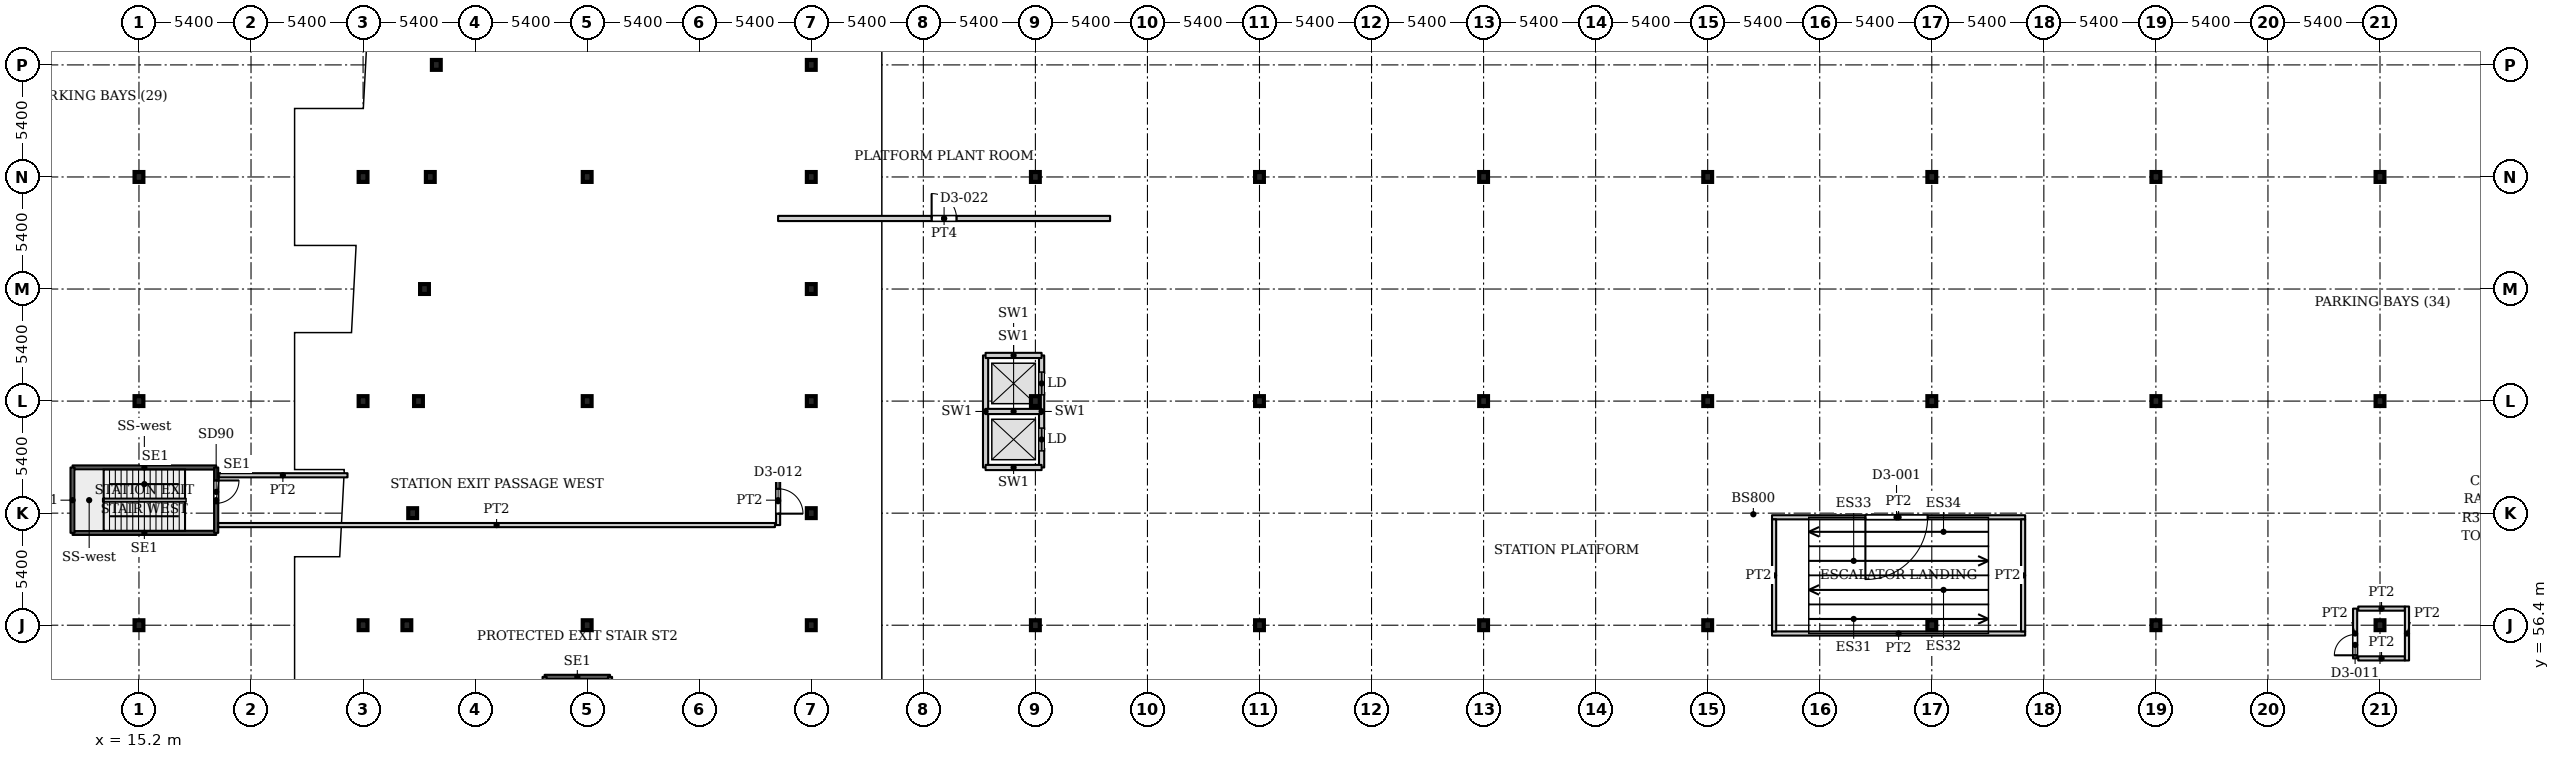
"""IFC4 building model, lengths in metres.
Left out: names, types, materials, properties, quantities, classifications, styles, units other than length and angle.
Written with IfcOpenShell. Run it as: python <this file> out.ifc"""

import sys

from ifc_helpers import new_model, si_unit, direction, frame, frame_2d, origin, origin_2d, place, context, subcontext, project, spatial, rectangle, i_section, extrude, source, transform, mapped, element, fill, save


model = new_model("IFC4")
c1 = context("Model", 3, precision=1e-05, world=origin(), true_north=direction((0.0, 1.0)))
c2 = subcontext(c1, "Body", "Model", "MODEL_VIEW")
j1 = project(units=[si_unit("LENGTHUNIT", "METRE"), si_unit("PLANEANGLEUNIT", "RADIAN")], contexts=[c1])
p1 = place(None, origin())
s1 = spatial("IfcSite", under=j1, at=p1, CompositionType="ELEMENT")
p2 = place(p1, origin())
s2 = spatial("IfcBuilding", under=s1, at=p2, CompositionType="ELEMENT")
p3 = place(p2, frame((0.0, 0.0, -15.0)))
s3 = spatial("IfcBuildingStorey", under=s2, at=p3, CompositionType="ELEMENT", Elevation=-15.0)
for number, where, z_axis, x_axis in (
    (1, (15.2, 56.4, 0.0), (0.0, 0.0, 1.0), (1.0, 0.0, 0.0)),
    (2, (26.0, 56.4, 0.0), (0.0, 0.0, 1.0), (1.0, 0.0, 0.0)),
    (3, (36.8, 56.4, 0.0), (0.0, 0.0, 1.0), (1.0, 0.0, 0.0)),
    (4, (47.6, 56.4, 0.0), (0.0, 0.0, 1.0), (1.0, 0.0, 0.0)),
    (5, (58.4, 56.4, 0.0), (0.0, 0.0, 1.0), (1.0, 0.0, 0.0)),
    (6, (69.2, 56.4, 0.0), (0.0, 0.0, 1.0), (1.0, 0.0, 0.0)),
    (7, (80.0, 56.4, 0.0), (0.0, 0.0, 1.0), (1.0, 0.0, 0.0)),
    (8, (90.8, 56.4, 0.0), (0.0, 0.0, 1.0), (1.0, 0.0, 0.0)),
    (9, (101.6, 56.4, 0.0), (0.0, 0.0, 1.0), (1.0, 0.0, 0.0)),
    (10, (112.4, 56.4, 0.0), (0.0, 0.0, 1.0), (1.0, 0.0, 0.0)),
    (11, (123.2, 56.4, 0.0), (0.0, 0.0, 1.0), (1.0, 0.0, 0.0)),
    (12, (15.2, 67.2, 0.0), (0.0, 0.0, 1.0), (1.0, 0.0, 0.0)),
    (13, (26.0, 67.2, 0.0), (0.0, 0.0, 1.0), (1.0, 0.0, 0.0)),
    (14, (36.8, 67.2, 0.0), (0.0, 0.0, 1.0), (1.0, 0.0, 0.0)),
    (15, (47.6, 67.2, 0.0), (0.0, 0.0, 1.0), (1.0, 0.0, 0.0)),
    (16, (58.4, 67.2, 0.0), (0.0, 0.0, 1.0), (1.0, 0.0, 0.0)),
    (17, (69.2, 67.2, 0.0), (0.0, 0.0, 1.0), (1.0, 0.0, 0.0)),
    (18, (80.0, 67.2, 0.0), (0.0, 0.0, 1.0), (1.0, 0.0, 0.0)),
    (19, (90.8, 67.2, 0.0), (0.0, 0.0, 1.0), (1.0, 0.0, 0.0)),
    (20, (101.6, 67.2, 0.0), (0.0, 0.0, 1.0), (1.0, 0.0, 0.0)),
    (21, (112.4, 67.2, 0.0), (0.0, 0.0, 1.0), (1.0, 0.0, 0.0)),
    (22, (123.2, 67.2, 0.0), (0.0, 0.0, 1.0), (1.0, 0.0, 0.0)),
    (23, (15.2, 78.0, 0.0), (0.0, 0.0, 1.0), (1.0, 0.0, 0.0)),
    (24, (26.0, 78.0, 0.0), (0.0, 0.0, 1.0), (1.0, 0.0, 0.0)),
    (25, (36.8, 78.0, 0.0), (0.0, 0.0, 1.0), (1.0, 0.0, 0.0)),
    (26, (47.6, 78.0, 0.0), (0.0, 0.0, 1.0), (1.0, 0.0, 0.0)),
    (27, (58.4, 78.0, 0.0), (0.0, 0.0, 1.0), (1.0, 0.0, 0.0)),
    (28, (69.2, 78.0, 0.0), (0.0, 0.0, 1.0), (1.0, 0.0, 0.0)),
    (29, (80.0, 78.0, 0.0), (0.0, 0.0, 1.0), (1.0, 0.0, 0.0)),
    (30, (90.8, 78.0, 0.0), (0.0, 0.0, 1.0), (1.0, 0.0, 0.0)),
    (31, (101.6, 78.0, 0.0), (0.0, 0.0, 1.0), (1.0, 0.0, 0.0)),
    (32, (112.4, 78.0, 0.0), (0.0, 0.0, 1.0), (1.0, 0.0, 0.0)),
    (33, (123.2, 78.0, 0.0), (0.0, 0.0, 1.0), (1.0, 0.0, 0.0)),
    (34, (28.11, 56.4, 0.0), (0.0, 0.0, 1.0), (1.0, 0.0, 0.0)),
    (35, (28.39, 61.8, 0.0), (0.0, 0.0, 1.0), (1.0, 0.0, 0.0)),
    (36, (47.6, 61.8, 0.0), (0.0, 0.0, 1.0), (1.0, 0.0, 0.0)),
    (37, (28.67, 67.2, 0.0), (0.0, 0.0, 1.0), (1.0, 0.0, 0.0)),
    (38, (28.96, 72.6, 0.0), (0.0, 0.0, 1.0), (1.0, 0.0, 0.0)),
    (39, (47.6, 72.6, 0.0), (0.0, 0.0, 1.0), (1.0, 0.0, 0.0)),
    (40, (29.24, 78.0, 0.0), (0.0, 0.0, 1.0), (1.0, 0.0, 0.0)),
    (41, (29.53, 83.4, 0.0), (0.0, 0.0, 1.0), (1.0, 0.0, 0.0)),
    (42, (47.6, 83.4, 0.0), (0.0, 0.0, 1.0), (1.0, 0.0, 0.0)),
):
    element("IfcColumn", number, at=place(p3, frame(where, z_axis=z_axis, x_axis=x_axis)), inside=s3, PredefinedType="COLUMN", context=c2, shape_type="SweptSolid", body=[
        extrude(i_section(OverallWidth=0.424, OverallDepth=0.474, WebThickness=0.048, FlangeThickness=0.077, FilletRadius=0.014, at=origin_2d()), origin(), (0.0, 0.0, 1.0), 5.0),
    ])
p4 = place(p3, frame((34.75, 53.91, 0.0), z_axis=(0.0, 0.0, 1.0), x_axis=(1.0, 0.0, 0.0)))
e43 = element("IfcWall", 43, at=p4, inside=s3, PredefinedType="SHEAR", context=c2, shape_type="SweptSolid", body=[
    extrude(rectangle(XDim=3.15, YDim=0.2, at=frame_2d((1.575, 0.0))), origin(), (0.0, 0.0, 1.0), 5.0),
])
p5 = place(p3, frame((34.75, 47.5, 0.0), z_axis=(0.0, 0.0, 1.0), x_axis=(0.0, 1.0, 0.0)))
e44 = element("IfcWall", 44, at=p5, inside=s3, PredefinedType="SHEAR", context=c2, shape_type="SweptSolid", body=[
    extrude(rectangle(XDim=6.41, YDim=0.2, at=frame_2d((3.205, 0.0))), origin(), (0.0, 0.0, 1.0), 5.0),
])
p6 = place(p3, frame((37.9, 44.75, 0.0), z_axis=(0.0, 0.0, 1.0), x_axis=(0.0, 1.0, 0.0)))
e45 = element("IfcWall", 45, at=p6, inside=s3, PredefinedType="SHEAR", context=c2, shape_type="SweptSolid", body=[
    extrude(rectangle(XDim=9.16, YDim=0.2, at=frame_2d((4.58, 0.0))), origin(), (0.0, 0.0, 1.0), 5.0),
])
p7 = place(p3, frame((56.0, 64.0, 0.0), z_axis=(0.0, 0.0, 1.0), x_axis=(0.0, 1.0, 0.0)))
e46 = element("IfcWall", 46, at=p7, inside=s3, PredefinedType="PARTITIONING", context=c2, shape_type="SweptSolid", body=[
    extrude(rectangle(XDim=5.4, YDim=0.25, at=frame_2d((2.7, 0.0))), origin(), (0.0, 0.0, 1.0), 5.0),
])
p8 = place(p3, frame((58.7, 64.0, 0.0), z_axis=(0.0, 0.0, 1.0), x_axis=(0.0, 1.0, 0.0)))
e47 = element("IfcWall", 47, at=p8, inside=s3, PredefinedType="PARTITIONING", context=c2, shape_type="SweptSolid", body=[
    extrude(rectangle(XDim=5.4, YDim=0.25, at=frame_2d((2.7, 0.0))), origin(), (0.0, 0.0, 1.0), 5.0),
])
p9 = place(p8, frame((0.8, 0.0, 0.0)))
e48 = element("IfcOpeningElement", 48, at=p9, cuts=e47, PredefinedType="OPENING", context=c2, shape_type="SweptSolid", body=[
    extrude(rectangle(XDim=1.1, YDim=2.2, at=frame_2d((0.55, 1.1))), frame((0.0, 0.135, 0.0), z_axis=(0.0, -1.0, 0.0), x_axis=(1.0, 0.0, 0.0)), (0.0, 0.0, 1.0), 0.27),
])
p10 = place(p8, frame((3.5, 0.0, 0.0)))
e49 = element("IfcOpeningElement", 49, at=p10, cuts=e47, PredefinedType="OPENING", context=c2, shape_type="SweptSolid", body=[
    extrude(rectangle(XDim=1.1, YDim=2.2, at=frame_2d((0.55, 1.1))), frame((0.0, 0.135, 0.0), z_axis=(0.0, -1.0, 0.0), x_axis=(1.0, 0.0, 0.0)), (0.0, 0.0, 1.0), 0.27),
])
for number, where, z_axis, x_axis in (
    (50, (56.0, 64.0, 0.0), (0.0, 0.0, 1.0), (1.0, 0.0, 0.0)),
    (51, (56.0, 66.7, 0.0), (0.0, 0.0, 1.0), (1.0, 0.0, 0.0)),
    (52, (56.0, 69.4, 0.0), (0.0, 0.0, 1.0), (1.0, 0.0, 0.0)),
):
    element("IfcWall", number, at=place(p3, frame(where, z_axis=z_axis, x_axis=x_axis)), inside=s3, PredefinedType="PARTITIONING", context=c2, shape_type="SweptSolid", body=[
        extrude(rectangle(XDim=2.7, YDim=0.25, at=frame_2d((1.35, 0.0))), origin(), (0.0, 0.0, 1.0), 5.0),
    ])
for number, where, z_axis, x_axis in (
    (53, (12.0, 60.85, 0.0), (0.0, 0.0, 1.0), (1.0, 0.0, 0.0)),
    (54, (12.0, 64.0, 0.0), (0.0, 0.0, 1.0), (1.0, 0.0, 0.0)),
):
    element("IfcWall", number, at=place(p3, frame(where, z_axis=z_axis, x_axis=x_axis)), inside=s3, PredefinedType="SHEAR", context=c2, shape_type="SweptSolid", body=[
        extrude(rectangle(XDim=6.92, YDim=0.2, at=frame_2d((3.46, 0.0))), origin(), (0.0, 0.0, 1.0), 5.0),
    ])
p11 = place(p3, frame((12.0, 60.85, 0.0), z_axis=(0.0, 0.0, 1.0), x_axis=(0.0, 1.0, 0.0)))
e55 = element("IfcWall", 55, at=p11, inside=s3, PredefinedType="SHEAR", context=c2, shape_type="SweptSolid", body=[
    extrude(rectangle(XDim=3.15, YDim=0.2, at=frame_2d((1.575, 0.0))), origin(), (0.0, 0.0, 1.0), 5.0),
])
p12 = place(p3, frame((18.92, 60.85, 0.0), z_axis=(0.0, 0.0, 1.0), x_axis=(0.0, 1.0, 0.0)))
e56 = element("IfcWall", 56, at=p12, inside=s3, PredefinedType="SHEAR", context=c2, shape_type="SweptSolid", body=[
    extrude(rectangle(XDim=3.15, YDim=0.2, at=frame_2d((1.575, 0.0))), origin(), (0.0, 0.0, 1.0), 5.0),
])
p13 = place(p12, frame((1.425, 0.0, 0.0)))
e57 = element("IfcOpeningElement", 57, at=p13, cuts=e56, PredefinedType="OPENING", context=c2, shape_type="SweptSolid", body=[
    extrude(rectangle(XDim=1.1, YDim=2.2, at=frame_2d((0.55, 1.1))), frame((0.0, 0.11, 0.0), z_axis=(0.0, -1.0, 0.0), x_axis=(1.0, 0.0, 0.0)), (0.0, 0.0, 1.0), 0.22),
])
p14 = place(p3, frame((19.02, 61.225, 0.0), z_axis=(0.0, 0.0, 1.0), x_axis=(1.0, 0.0, 0.0)))
e58 = element("IfcWall", 58, at=p14, inside=s3, PredefinedType="PARTITIONING", context=c2, shape_type="SweptSolid", body=[
    extrude(rectangle(XDim=26.83, YDim=0.2, at=frame_2d((13.415, 0.0))), origin(), (0.0, 0.0, 1.0), 4.68),
])
p15 = place(p3, frame((19.02, 63.625, 0.0), z_axis=(0.0, 0.0, 1.0), x_axis=(1.0, 0.0, 0.0)))
e59 = element("IfcWall", 59, at=p15, inside=s3, PredefinedType="PARTITIONING", context=c2, shape_type="SweptSolid", body=[
    extrude(rectangle(XDim=6.23, YDim=0.2, at=frame_2d((3.115, 0.0))), origin(), (0.0, 0.0, 1.0), 4.68),
])
p16 = place(p3, frame((46.0, 61.225, 0.0), z_axis=(0.0, 0.0, 1.0), x_axis=(0.0, 1.0, 0.0)))
e60 = element("IfcWall", 60, at=p16, inside=s3, PredefinedType="PARTITIONING", context=c2, shape_type="SweptSolid", body=[
    extrude(rectangle(XDim=2.4, YDim=0.2, at=frame_2d((1.2, 0.0))), origin(), (0.0, 0.0, 1.0), 4.68),
])
p17 = place(p16, frame((0.55, 0.0, 0.0)))
e61 = element("IfcOpeningElement", 61, at=p17, cuts=e60, PredefinedType="OPENING", context=c2, shape_type="SweptSolid", body=[
    extrude(rectangle(XDim=1.2, YDim=2.1, at=frame_2d((0.6, 1.05))), frame((0.0, 0.11, 0.0), z_axis=(0.0, -1.0, 0.0), x_axis=(1.0, 0.0, 0.0)), (0.0, 0.0, 1.0), 0.22),
])
p18 = place(p3, frame((46.0, 76.0, 0.0), z_axis=(0.0, 0.0, 1.0), x_axis=(1.0, 0.0, 0.0)))
e62 = element("IfcWall", 62, at=p18, inside=s3, PredefinedType="PARTITIONING", context=c2, shape_type="SweptSolid", body=[
    extrude(rectangle(XDim=16.0, YDim=0.25, at=frame_2d((8.0, 0.0))), origin(), (0.0, 0.0, 1.0), 4.68),
])
p19 = place(p18, frame((7.4, 0.0, 0.0)))
e63 = element("IfcOpeningElement", 63, at=p19, cuts=e62, PredefinedType="OPENING", context=c2, shape_type="SweptSolid", body=[
    extrude(rectangle(XDim=1.2, YDim=2.1, at=frame_2d((0.6, 1.05))), frame((0.0, 0.135, 0.0), z_axis=(0.0, -1.0, 0.0), x_axis=(1.0, 0.0, 0.0)), (0.0, 0.0, 1.0), 0.27),
])
p20 = place(p3, frame((93.9, 56.0, 0.0), z_axis=(0.0, 0.0, 1.0), x_axis=(1.0, 0.0, 0.0)))
e64 = element("IfcWall", 64, at=p20, inside=s3, PredefinedType="PARTITIONING", context=c2, shape_type="SweptSolid", body=[
    extrude(rectangle(XDim=12.2, YDim=0.2, at=frame_2d((6.1, 0.0))), origin(), (0.0, 0.0, 1.0), 4.68),
])
p21 = place(p3, frame((93.9, 61.6, 0.0), z_axis=(0.0, 0.0, 1.0), x_axis=(1.0, 0.0, 0.0)))
e65 = element("IfcWall", 65, at=p21, inside=s3, PredefinedType="PARTITIONING", context=c2, shape_type="SweptSolid", body=[
    extrude(rectangle(XDim=12.2, YDim=0.2, at=frame_2d((6.1, 0.0))), origin(), (0.0, 0.0, 1.0), 4.68),
])
p22 = place(p21, frame((4.5, 0.0, 0.0)))
e66 = element("IfcOpeningElement", 66, at=p22, cuts=e65, PredefinedType="OPENING", context=c2, shape_type="SweptSolid", body=[
    extrude(rectangle(XDim=3.0, YDim=2.1, at=frame_2d((1.5, 1.05))), frame((0.0, 0.11, 0.0), z_axis=(0.0, -1.0, 0.0), x_axis=(1.0, 0.0, 0.0)), (0.0, 0.0, 1.0), 0.22),
])
for number, where, z_axis, x_axis in (
    (67, (94.0, 56.1, 0.0), (0.0, 0.0, 1.0), (0.0, 1.0, 0.0)),
    (68, (106.0, 56.1, 0.0), (0.0, 0.0, 1.0), (0.0, 1.0, 0.0)),
):
    element("IfcWall", number, at=place(p3, frame(where, z_axis=z_axis, x_axis=x_axis)), inside=s3, PredefinedType="PARTITIONING", context=c2, shape_type="SweptSolid", body=[
        extrude(rectangle(XDim=5.4, YDim=0.2, at=frame_2d((2.7, 0.0))), origin(), (0.0, 0.0, 1.0), 4.68),
    ])
p23 = place(p3, frame((122.0, 54.8, 0.0), z_axis=(0.0, 0.0, 1.0), x_axis=(0.0, 1.0, 0.0)))
e69 = element("IfcWall", 69, at=p23, inside=s3, PredefinedType="PARTITIONING", context=c2, shape_type="SweptSolid", body=[
    extrude(rectangle(XDim=2.4, YDim=0.2, at=frame_2d((1.2, 0.0))), origin(), (0.0, 0.0, 1.0), 4.68),
])
p24 = place(p23, frame((0.15, 0.0, 0.0)))
e70 = element("IfcOpeningElement", 70, at=p24, cuts=e69, PredefinedType="OPENING", context=c2, shape_type="SweptSolid", body=[
    extrude(rectangle(XDim=1.0, YDim=2.1, at=frame_2d((0.5, 1.05))), frame((0.0, 0.11, 0.0), z_axis=(0.0, -1.0, 0.0), x_axis=(1.0, 0.0, 0.0)), (0.0, 0.0, 1.0), 0.22),
])
for number, where, z_axis, x_axis in (
    (71, (122.15, 54.8, 0.0), (0.0, 0.0, 1.0), (1.0, 0.0, 0.0)),
    (72, (122.15, 57.2, 0.0), (0.0, 0.0, 1.0), (1.0, 0.0, 0.0)),
):
    element("IfcWall", number, at=place(p3, frame(where, z_axis=z_axis, x_axis=x_axis)), inside=s3, PredefinedType="PARTITIONING", context=c2, shape_type="SweptSolid", body=[
        extrude(rectangle(XDim=2.25, YDim=0.2, at=frame_2d((1.125, 0.0))), origin(), (0.0, 0.0, 1.0), 4.68),
    ])
p25 = place(p3, frame((124.5, 54.7, 0.0), z_axis=(0.0, 0.0, 1.0), x_axis=(0.0, 1.0, 0.0)))
e73 = element("IfcWall", 73, at=p25, inside=s3, PredefinedType="PARTITIONING", context=c2, shape_type="SweptSolid", body=[
    extrude(rectangle(XDim=2.6, YDim=0.2, at=frame_2d((1.3, 0.0))), origin(), (0.0, 0.0, 1.0), 4.68),
])
m1 = source(origin(), c2, "Body", "SweptSolid", [
    extrude(rectangle(XDim=1.1, YDim=2.2, at=frame_2d((0.55, 1.1))), frame((0.0, 0.025, 0.0), z_axis=(0.0, -1.0, 0.0), x_axis=(1.0, 0.0, 0.0)), (0.0, 0.0, 1.0), 0.05),
])
p26 = place(p9, origin())
e74 = element("IfcDoor", 74, at=p26, inside=s3, OperationType="SLIDING_TO_LEFT", PredefinedType="DOOR", context=c2, shape_type="MappedRepresentation", body=[
    mapped(m1, transform((0.0, 0.0, 0.0), x_axis=(1.0, 0.0, 0.0), y_axis=(0.0, 1.0, 0.0), z_axis=(0.0, 0.0, 1.0), scale=1.0)),
])
fill(e48, e74)
p27 = place(p10, origin())
e75 = element("IfcDoor", 75, at=p27, inside=s3, OperationType="SLIDING_TO_LEFT", PredefinedType="DOOR", context=c2, shape_type="MappedRepresentation", body=[
    mapped(m1, transform((0.0, 0.0, 0.0), x_axis=(1.0, 0.0, 0.0), y_axis=(0.0, 1.0, 0.0), z_axis=(0.0, 0.0, 1.0), scale=1.0)),
])
fill(e49, e75)
m2 = source(origin(), c2, "Body", "SweptSolid", [
    extrude(rectangle(XDim=1.1, YDim=2.2, at=frame_2d((0.55, 1.1))), frame((0.0, 0.025, 0.0), z_axis=(0.0, -1.0, 0.0), x_axis=(1.0, 0.0, 0.0)), (0.0, 0.0, 1.0), 0.05),
])
p28 = place(p13, origin())
e76 = element("IfcDoor", 76, at=p28, inside=s3, OperationType="SINGLE_SWING_RIGHT", PredefinedType="DOOR", context=c2, shape_type="MappedRepresentation", body=[
    mapped(m2, transform((0.0, 0.0, 0.0), x_axis=(1.0, 0.0, 0.0), y_axis=(0.0, 1.0, 0.0), z_axis=(0.0, 0.0, 1.0), scale=1.0)),
])
fill(e57, e76)
m3 = source(origin(), c2, "Body", "SweptSolid", [
    extrude(rectangle(XDim=3.0, YDim=2.1, at=frame_2d((1.5, 1.05))), frame((0.0, 0.025, 0.0), z_axis=(0.0, -1.0, 0.0), x_axis=(1.0, 0.0, 0.0)), (0.0, 0.0, 1.0), 0.05),
])
p29 = place(p22, origin())
e77 = element("IfcDoor", 77, at=p29, inside=s3, OperationType="DOUBLE_DOOR_SINGLE_SWING", PredefinedType="DOOR", context=c2, shape_type="MappedRepresentation", body=[
    mapped(m3, transform((0.0, 0.0, 0.0), x_axis=(1.0, 0.0, 0.0), y_axis=(0.0, 1.0, 0.0), z_axis=(0.0, 0.0, 1.0), scale=1.0)),
])
fill(e66, e77)
m4 = source(origin(), c2, "Body", "SweptSolid", [
    extrude(rectangle(XDim=1.0, YDim=2.1, at=frame_2d((0.5, 1.05))), frame((0.0, 0.025, 0.0), z_axis=(0.0, -1.0, 0.0), x_axis=(1.0, 0.0, 0.0)), (0.0, 0.0, 1.0), 0.05),
])
p30 = place(p24, origin())
e78 = element("IfcDoor", 78, at=p30, inside=s3, OperationType="SINGLE_SWING_LEFT", PredefinedType="DOOR", context=c2, shape_type="MappedRepresentation", body=[
    mapped(m4, transform((0.0, 0.0, 0.0), x_axis=(1.0, 0.0, 0.0), y_axis=(0.0, 1.0, 0.0), z_axis=(0.0, 0.0, 1.0), scale=1.0)),
])
fill(e70, e78)
m5 = source(origin(), c2, "Body", "SweptSolid", [
    extrude(rectangle(XDim=1.2, YDim=2.1, at=frame_2d((0.6, 1.05))), frame((0.0, 0.025, 0.0), z_axis=(0.0, -1.0, 0.0), x_axis=(1.0, 0.0, 0.0)), (0.0, 0.0, 1.0), 0.05),
])
p31 = place(p17, origin())
e79 = element("IfcDoor", 79, at=p31, inside=s3, OperationType="SINGLE_SWING_RIGHT", PredefinedType="DOOR", context=c2, shape_type="MappedRepresentation", body=[
    mapped(m5, transform((0.0, 0.0, 0.0), x_axis=(1.0, 0.0, 0.0), y_axis=(0.0, 1.0, 0.0), z_axis=(0.0, 0.0, 1.0), scale=1.0)),
])
fill(e61, e79)
m6 = source(origin(), c2, "Body", "SweptSolid", [
    extrude(rectangle(XDim=1.2, YDim=2.1, at=frame_2d((0.6, 1.05))), frame((0.0, 0.025, 0.0), z_axis=(0.0, -1.0, 0.0), x_axis=(1.0, 0.0, 0.0)), (0.0, 0.0, 1.0), 0.05),
])
p32 = place(p19, origin())
e80 = element("IfcDoor", 80, at=p32, inside=s3, OperationType="SINGLE_SWING_LEFT", PredefinedType="DOOR", context=c2, shape_type="MappedRepresentation", body=[
    mapped(m6, transform((0.0, 0.0, 0.0), x_axis=(1.0, 0.0, 0.0), y_axis=(0.0, 1.0, 0.0), z_axis=(0.0, 0.0, 1.0), scale=1.0)),
])
fill(e63, e80)
save(model, sys.argv[1])
